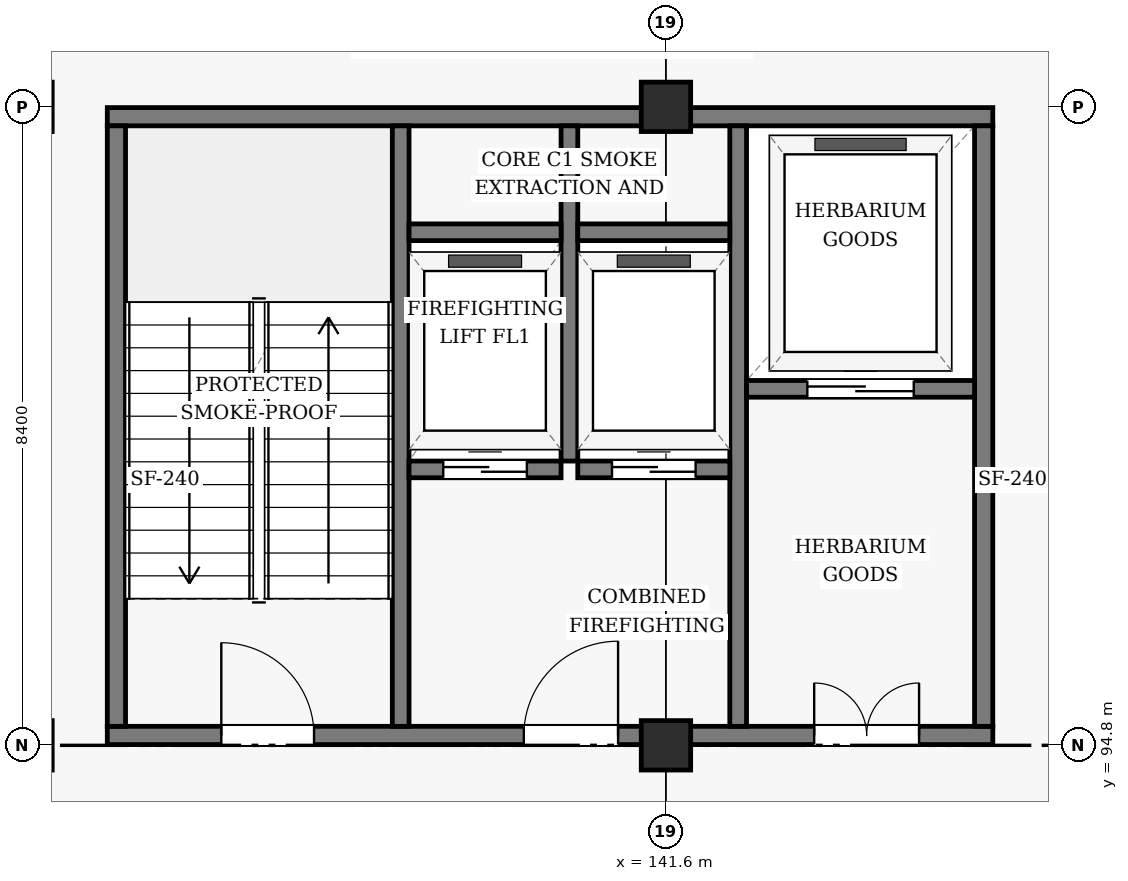
"""IFC4 building model, lengths in metres.
Left out: names, types, materials, properties, quantities, classifications, styles, units other than length and angle.
Written with IfcOpenShell. Run it as: python <this file> out.ifc"""

import sys

from ifc_helpers import new_model, si_unit, direction, frame, frame_2d, origin, origin_2d, place, context, subcontext, project, spatial, rectangle, hollow_rectangle, extrude, element, fill, save


model = new_model("IFC4")
c1 = context("Model", 3, precision=1e-05, world=origin(), true_north=direction((0.0, 1.0)))
c2 = subcontext(c1, "Body", "Model", "MODEL_VIEW")
j1 = project(units=[si_unit("LENGTHUNIT", "METRE"), si_unit("PLANEANGLEUNIT", "RADIAN")], contexts=[c1])
p1 = place(None, origin())
s1 = spatial("IfcSite", under=j1, at=p1, CompositionType="ELEMENT")
p2 = place(p1, origin())
s2 = spatial("IfcBuilding", under=s1, at=p2, CompositionType="ELEMENT")
p3 = place(p2, frame((0.0, 0.0, 4.8)))
s3 = spatial("IfcBuildingStorey", under=s2, at=p3, CompositionType="ELEMENT", Elevation=4.8)
for number, where, z_axis, x_axis in (
    (1, (141.6, 94.8, 0.0), (0.0, 0.0, 1.0), (1.0, 0.0, 0.0)),
    (2, (141.6, 103.2, 0.0), (0.0, 0.0, 1.0), (1.0, 0.0, 0.0)),
):
    element("IfcColumn", number, at=place(p3, frame(where, z_axis=z_axis, x_axis=x_axis)), inside=s3, PredefinedType="COLUMN", context=c2, shape_type="SweptSolid", body=[
        extrude(hollow_rectangle(XDim=0.65, YDim=0.65, WallThickness=0.028, InnerFilletRadius=0.028, OuterFilletRadius=0.056, at=origin_2d()), origin(), (0.0, 0.0, 1.0), 4.2),
    ])
p4 = place(p3, frame((134.25, 94.93, 0.0), z_axis=(0.0, 0.0, 1.0), x_axis=(1.0, 0.0, 0.0)))
e3 = element("IfcWall", 3, at=p4, inside=s3, PredefinedType="SHEAR", context=c2, shape_type="SweptSolid", body=[
    extrude(rectangle(XDim=11.65, YDim=0.24, at=frame_2d((5.825, 0.0))), origin(), (0.0, 0.0, 1.0), 3.955),
])
p5 = place(p4, frame((1.5, 0.0, 0.0)))
e4 = element("IfcOpeningElement", 4, at=p5, cuts=e3, PredefinedType="OPENING", context=c2, shape_type="SweptSolid", body=[
    extrude(rectangle(XDim=1.22, YDim=2.18, at=frame_2d((0.61, 1.09))), frame((0.0, 0.13, 0.0), z_axis=(0.0, -1.0, 0.0), x_axis=(1.0, 0.0, 0.0)), (0.0, 0.0, 1.0), 0.26),
])
p6 = place(p4, frame((5.48, 0.0, 0.0)))
e5 = element("IfcOpeningElement", 5, at=p6, cuts=e3, PredefinedType="OPENING", context=c2, shape_type="SweptSolid", body=[
    extrude(rectangle(XDim=1.24, YDim=2.15, at=frame_2d((0.62, 1.075))), frame((0.0, 0.13, 0.0), z_axis=(0.0, -1.0, 0.0), x_axis=(1.0, 0.0, 0.0)), (0.0, 0.0, 1.0), 0.26),
])
p7 = place(p4, frame((9.3, 0.0, 0.0)))
e6 = element("IfcOpeningElement", 6, at=p7, cuts=e3, PredefinedType="OPENING", context=c2, shape_type="SweptSolid", body=[
    extrude(rectangle(XDim=1.38, YDim=2.15, at=frame_2d((0.69, 1.075))), frame((0.0, 0.13, 0.0), z_axis=(0.0, -1.0, 0.0), x_axis=(1.0, 0.0, 0.0)), (0.0, 0.0, 1.0), 0.26),
])
p8 = place(p3, frame((134.25, 103.07, 0.0), z_axis=(0.0, 0.0, 1.0), x_axis=(1.0, 0.0, 0.0)))
e7 = element("IfcWall", 7, at=p8, inside=s3, PredefinedType="SHEAR", context=c2, shape_type="SweptSolid", body=[
    extrude(rectangle(XDim=11.65, YDim=0.24, at=frame_2d((5.825, 0.0))), origin(), (0.0, 0.0, 1.0), 3.955),
])
p9 = place(p3, frame((134.37, 95.05, 0.0), z_axis=(0.0, 0.0, 1.0), x_axis=(0.0, 1.0, 0.0)))
e8 = element("IfcWall", 8, at=p9, inside=s3, PredefinedType="SHEAR", context=c2, shape_type="SweptSolid", body=[
    extrude(rectangle(XDim=7.9, YDim=0.24, at=frame_2d((3.95, 0.0))), origin(), (0.0, 0.0, 1.0), 3.955),
])
p10 = place(p3, frame((138.11, 95.05, 0.0), z_axis=(0.0, 0.0, 1.0), x_axis=(0.0, 1.0, 0.0)))
e9 = element("IfcWall", 9, at=p10, inside=s3, PredefinedType="SHEAR", context=c2, shape_type="SweptSolid", body=[
    extrude(rectangle(XDim=7.9, YDim=0.22, at=frame_2d((3.95, 0.0))), origin(), (0.0, 0.0, 1.0), 3.955),
])
p11 = place(p3, frame((140.33, 98.54, 0.0), z_axis=(0.0, 0.0, 1.0), x_axis=(0.0, 1.0, 0.0)))
e10 = element("IfcWall", 10, at=p11, inside=s3, PredefinedType="SHEAR", context=c2, shape_type="SweptSolid", body=[
    extrude(rectangle(XDim=4.41, YDim=0.22, at=frame_2d((2.205, 0.0))), origin(), (0.0, 0.0, 1.0), 3.955),
])
p12 = place(p3, frame((142.55, 95.05, 0.0), z_axis=(0.0, 0.0, 1.0), x_axis=(0.0, 1.0, 0.0)))
e11 = element("IfcWall", 11, at=p12, inside=s3, PredefinedType="SHEAR", context=c2, shape_type="SweptSolid", body=[
    extrude(rectangle(XDim=7.9, YDim=0.22, at=frame_2d((3.95, 0.0))), origin(), (0.0, 0.0, 1.0), 3.955),
])
p13 = place(p3, frame((145.78, 95.05, 0.0), z_axis=(0.0, 0.0, 1.0), x_axis=(0.0, 1.0, 0.0)))
e12 = element("IfcWall", 12, at=p13, inside=s3, PredefinedType="SHEAR", context=c2, shape_type="SweptSolid", body=[
    extrude(rectangle(XDim=7.9, YDim=0.24, at=frame_2d((3.95, 0.0))), origin(), (0.0, 0.0, 1.0), 3.955),
])
p14 = place(p3, frame((138.22, 98.43, 0.0), z_axis=(0.0, 0.0, 1.0), x_axis=(1.0, 0.0, 0.0)))
e13 = element("IfcWall", 13, at=p14, inside=s3, PredefinedType="SHEAR", context=c2, shape_type="SweptSolid", body=[
    extrude(rectangle(XDim=2.0, YDim=0.22, at=frame_2d((1.0, 0.0))), origin(), (0.0, 0.0, 1.0), 3.955),
])
p15 = place(p14, frame((0.45, 0.0, 0.0)))
e14 = element("IfcOpeningElement", 14, at=p15, cuts=e13, PredefinedType="OPENING", context=c2, shape_type="SweptSolid", body=[
    extrude(rectangle(XDim=1.1, YDim=2.15, at=frame_2d((0.55, 1.075))), frame((0.0, 0.12, 0.0), z_axis=(0.0, -1.0, 0.0), x_axis=(1.0, 0.0, 0.0)), (0.0, 0.0, 1.0), 0.24),
])
p16 = place(p3, frame((140.44, 98.43, 0.0), z_axis=(0.0, 0.0, 1.0), x_axis=(1.0, 0.0, 0.0)))
e15 = element("IfcWall", 15, at=p16, inside=s3, PredefinedType="SHEAR", context=c2, shape_type="SweptSolid", body=[
    extrude(rectangle(XDim=2.0, YDim=0.22, at=frame_2d((1.0, 0.0))), origin(), (0.0, 0.0, 1.0), 3.955),
])
p17 = place(p16, frame((0.45, 0.0, 0.0)))
e16 = element("IfcOpeningElement", 16, at=p17, cuts=e15, PredefinedType="OPENING", context=c2, shape_type="SweptSolid", body=[
    extrude(rectangle(XDim=1.1, YDim=2.15, at=frame_2d((0.55, 1.075))), frame((0.0, 0.12, 0.0), z_axis=(0.0, -1.0, 0.0), x_axis=(1.0, 0.0, 0.0)), (0.0, 0.0, 1.0), 0.24),
])
for number, where, z_axis, x_axis in (
    (17, (138.22, 101.55, 0.0), (0.0, 0.0, 1.0), (1.0, 0.0, 0.0)),
    (18, (140.44, 101.55, 0.0), (0.0, 0.0, 1.0), (1.0, 0.0, 0.0)),
):
    element("IfcWall", number, at=place(p3, frame(where, z_axis=z_axis, x_axis=x_axis)), inside=s3, PredefinedType="SHEAR", context=c2, shape_type="SweptSolid", body=[
        extrude(rectangle(XDim=2.0, YDim=0.22, at=frame_2d((1.0, 0.0))), origin(), (0.0, 0.0, 1.0), 3.955),
    ])
p18 = place(p3, frame((142.66, 99.49, 0.0), z_axis=(0.0, 0.0, 1.0), x_axis=(1.0, 0.0, 0.0)))
e19 = element("IfcWall", 19, at=p18, inside=s3, PredefinedType="SHEAR", context=c2, shape_type="SweptSolid", body=[
    extrude(rectangle(XDim=3.0, YDim=0.22, at=frame_2d((1.5, 0.0))), origin(), (0.0, 0.0, 1.0), 3.955),
])
p19 = place(p18, frame((0.8, 0.0, 0.0)))
e20 = element("IfcOpeningElement", 20, at=p19, cuts=e19, PredefinedType="OPENING", context=c2, shape_type="SweptSolid", body=[
    extrude(rectangle(XDim=1.4, YDim=2.2, at=frame_2d((0.7, 1.1))), frame((0.0, 0.12, 0.0), z_axis=(0.0, -1.0, 0.0), x_axis=(1.0, 0.0, 0.0)), (0.0, 0.0, 1.0), 0.24),
])
p20 = place(p5, origin())
e21 = element("IfcDoor", 21, at=p20, inside=s3, OperationType="SINGLE_SWING_LEFT", PredefinedType="DOOR", context=c2, shape_type="SweptSolid", body=[
    extrude(rectangle(XDim=1.22, YDim=2.18, at=frame_2d((0.61, 1.09))), frame((0.0, 0.025, 0.0), z_axis=(0.0, -1.0, 0.0), x_axis=(1.0, 0.0, 0.0)), (0.0, 0.0, 1.0), 0.05),
])
fill(e4, e21)
p21 = place(p6, frame((1.24, 0.0, 0.0), z_axis=(0.0, 0.0, 1.0), x_axis=(-1.0, 0.0, 0.0)))
e22 = element("IfcDoor", 22, at=p21, inside=s3, OperationType="SINGLE_SWING_RIGHT", PredefinedType="DOOR", context=c2, shape_type="SweptSolid", body=[
    extrude(rectangle(XDim=1.24, YDim=2.15, at=frame_2d((0.62, 1.075))), frame((0.0, 0.025, 0.0), z_axis=(0.0, -1.0, 0.0), x_axis=(1.0, 0.0, 0.0)), (0.0, 0.0, 1.0), 0.05),
])
fill(e5, e22)
p22 = place(p7, frame((1.38, 0.0, 0.0), z_axis=(0.0, 0.0, 1.0), x_axis=(-1.0, 0.0, 0.0)))
e23 = element("IfcDoor", 23, at=p22, inside=s3, OperationType="DOUBLE_DOOR_SINGLE_SWING", PredefinedType="DOOR", context=c2, shape_type="SweptSolid", body=[
    extrude(rectangle(XDim=1.38, YDim=2.15, at=frame_2d((0.69, 1.075))), frame((0.0, 0.025, 0.0), z_axis=(0.0, -1.0, 0.0), x_axis=(1.0, 0.0, 0.0)), (0.0, 0.0, 1.0), 0.05),
])
fill(e6, e23)
p23 = place(p15, origin())
e24 = element("IfcDoor", 24, at=p23, inside=s3, OperationType="SLIDING_TO_LEFT", PredefinedType="DOOR", context=c2, shape_type="SweptSolid", body=[
    extrude(rectangle(XDim=1.1, YDim=2.15, at=frame_2d((0.55, 1.075))), frame((0.0, 0.025, 0.0), z_axis=(0.0, -1.0, 0.0), x_axis=(1.0, 0.0, 0.0)), (0.0, 0.0, 1.0), 0.05),
])
fill(e14, e24)
p24 = place(p17, origin())
e25 = element("IfcDoor", 25, at=p24, inside=s3, OperationType="SLIDING_TO_LEFT", PredefinedType="DOOR", context=c2, shape_type="SweptSolid", body=[
    extrude(rectangle(XDim=1.1, YDim=2.15, at=frame_2d((0.55, 1.075))), frame((0.0, 0.025, 0.0), z_axis=(0.0, -1.0, 0.0), x_axis=(1.0, 0.0, 0.0)), (0.0, 0.0, 1.0), 0.05),
])
fill(e16, e25)
p25 = place(p19, origin())
e26 = element("IfcDoor", 26, at=p25, inside=s3, OperationType="SLIDING_TO_LEFT", PredefinedType="DOOR", context=c2, shape_type="SweptSolid", body=[
    extrude(rectangle(XDim=1.4, YDim=2.2, at=frame_2d((0.7, 1.1))), frame((0.0, 0.025, 0.0), z_axis=(0.0, -1.0, 0.0), x_axis=(1.0, 0.0, 0.0)), (0.0, 0.0, 1.0), 0.05),
])
fill(e20, e26)
save(model, sys.argv[1])
